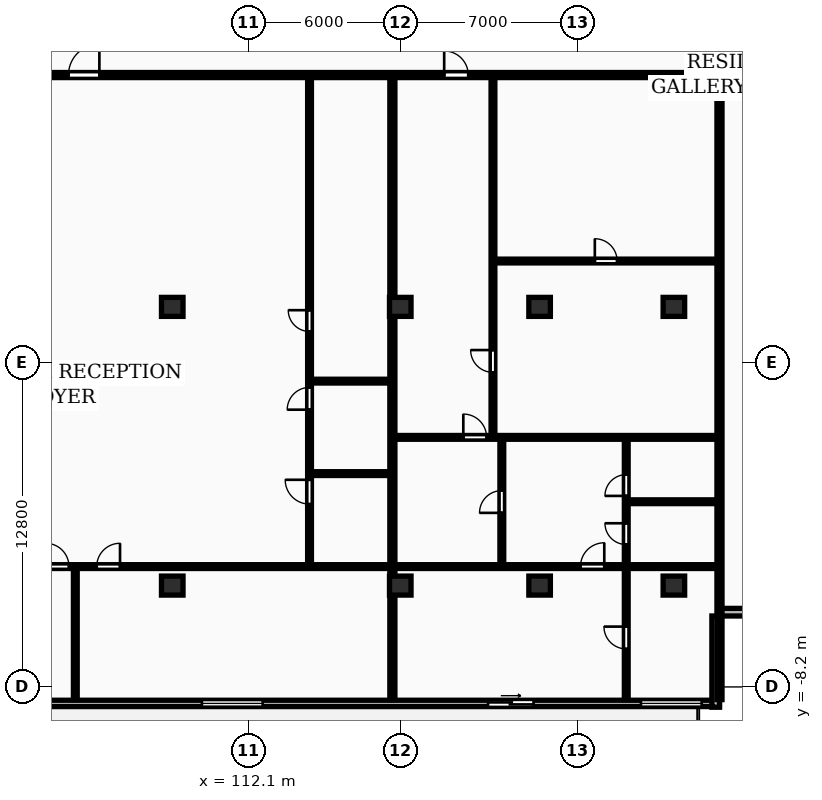
"""IFC4 building model, lengths in metres.
Left out: names, types, materials, properties, quantities, classifications, styles, units other than length and angle.
Written with IfcOpenShell. Run it as: python <this file> out.ifc"""

import sys

from ifc_helpers import new_model, si_unit, direction, frame, frame_2d, origin, origin_2d, place, context, subcontext, project, spatial, rectangle, extrude, element, fill, save


model = new_model("IFC4")
c1 = context("Model", 3, precision=1e-05, world=origin(), true_north=direction((0.0, 1.0)))
c2 = subcontext(c1, "Body", "Model", "MODEL_VIEW")
j1 = project(units=[si_unit("LENGTHUNIT", "METRE"), si_unit("PLANEANGLEUNIT", "RADIAN")], contexts=[c1])
p1 = place(None, origin())
s1 = spatial("IfcSite", under=j1, at=p1, CompositionType="ELEMENT")
p2 = place(p1, origin())
s2 = spatial("IfcBuilding", under=s1, at=p2, CompositionType="ELEMENT")
p3 = place(p2, frame((0.0, 0.0, 93.8)))
s3 = spatial("IfcBuildingStorey", under=s2, at=p3, CompositionType="ELEMENT", Elevation=93.8)
for number, where, z_axis, x_axis in (
    (1, (109.1, -4.2, 0.0), (0.0, 0.0, 1.0), (1.0, 0.0, 0.0)),
    (2, (109.1, 6.8, 0.0), (0.0, 0.0, 1.0), (1.0, 0.0, 0.0)),
    (3, (118.1, -4.2, 0.0), (0.0, 0.0, 1.0), (1.0, 0.0, 0.0)),
    (4, (118.1, 6.8, 0.0), (0.0, 0.0, 1.0), (1.0, 0.0, 0.0)),
    (5, (123.6, -4.2, 0.0), (0.0, 0.0, 1.0), (1.0, 0.0, 0.0)),
    (6, (123.6, 6.8, 0.0), (0.0, 0.0, 1.0), (1.0, 0.0, 0.0)),
    (7, (128.9, -4.2, 0.0), (0.0, 0.0, 1.0), (1.0, 0.0, 0.0)),
    (8, (128.9, 6.8, 0.0), (0.0, 0.0, 1.0), (1.0, 0.0, 0.0)),
):
    element("IfcColumn", number, at=place(p3, frame(where, z_axis=z_axis, x_axis=x_axis)), inside=s3, PredefinedType="COLUMN", context=c2, shape_type="SweptSolid", body=[
        extrude(rectangle(XDim=0.85, YDim=0.75, at=origin_2d()), origin(), (0.0, 0.0, 1.0), 3.25),
    ])
p4 = place(p3, frame((72.7, -8.85, 0.0), z_axis=(0.0, 0.0, 1.0), x_axis=(1.0, 0.0, 0.0)))
e9 = element("IfcWall", 9, at=p4, inside=s3, PredefinedType="STANDARD", context=c2, shape_type="SweptSolid", body=[
    extrude(rectangle(XDim=58.0, YDim=0.25, at=frame_2d((29.0, 0.0))), origin(), (0.0, 0.0, 1.0), 2.97),
])
p5 = place(p4, frame((4.117, 0.0, 0.0)))
e10 = element("IfcOpeningElement", 10, at=p5, cuts=e9, PredefinedType="OPENING", context=c2, shape_type="SweptSolid", body=[
    extrude(rectangle(XDim=1.8, YDim=2.2, at=frame_2d((0.9, 1.1))), frame((0.0, 0.135, 0.0), z_axis=(0.0, -1.0, 0.0), x_axis=(1.0, 0.0, 0.0)), (0.0, 0.0, 1.0), 0.27),
])
p6 = place(p4, frame((15.032, 0.0, 0.85)))
e11 = element("IfcOpeningElement", 11, at=p6, cuts=e9, PredefinedType="OPENING", context=c2, shape_type="SweptSolid", body=[
    extrude(rectangle(XDim=2.4, YDim=1.9, at=frame_2d((1.2, 0.95))), frame((0.0, 0.135, 0.0), z_axis=(0.0, -1.0, 0.0), x_axis=(1.0, 0.0, 0.0)), (0.0, 0.0, 1.0), 0.27),
])
p7 = place(p4, frame((26.781, 0.0, 0.0)))
e12 = element("IfcOpeningElement", 12, at=p7, cuts=e9, PredefinedType="OPENING", context=c2, shape_type="SweptSolid", body=[
    extrude(rectangle(XDim=1.8, YDim=2.2, at=frame_2d((0.9, 1.1))), frame((0.0, 0.135, 0.0), z_axis=(0.0, -1.0, 0.0), x_axis=(1.0, 0.0, 0.0)), (0.0, 0.0, 1.0), 0.27),
])
p8 = place(p4, frame((37.571, 0.0, 0.85)))
e13 = element("IfcOpeningElement", 13, at=p8, cuts=e9, PredefinedType="OPENING", context=c2, shape_type="SweptSolid", body=[
    extrude(rectangle(XDim=2.4, YDim=1.9, at=frame_2d((1.2, 0.95))), frame((0.0, 0.135, 0.0), z_axis=(0.0, -1.0, 0.0), x_axis=(1.0, 0.0, 0.0)), (0.0, 0.0, 1.0), 0.27),
])
p9 = place(p4, frame((48.864, 0.0, 0.0)))
e14 = element("IfcOpeningElement", 14, at=p9, cuts=e9, PredefinedType="OPENING", context=c2, shape_type="SweptSolid", body=[
    extrude(rectangle(XDim=1.8, YDim=2.2, at=frame_2d((0.9, 1.1))), frame((0.0, 0.135, 0.0), z_axis=(0.0, -1.0, 0.0), x_axis=(1.0, 0.0, 0.0)), (0.0, 0.0, 1.0), 0.27),
])
p10 = place(p4, frame((54.9, 0.0, 0.85)))
e15 = element("IfcOpeningElement", 15, at=p10, cuts=e9, PredefinedType="OPENING", context=c2, shape_type="SweptSolid", body=[
    extrude(rectangle(XDim=2.4, YDim=1.9, at=frame_2d((1.2, 0.95))), frame((0.0, 0.135, 0.0), z_axis=(0.0, -1.0, 0.0), x_axis=(1.0, 0.0, 0.0)), (0.0, 0.0, 1.0), 0.27),
])
for number, where, z_axis, x_axis in (
    (16, (130.55, -9.0, 0.0), (0.0, 0.0, 1.0), (0.0, 1.0, 0.0)),
    (17, (130.7, -5.25, 0.0), (0.0, 0.0, 1.0), (1.0, 0.0, 0.0)),
):
    element("IfcWall", number, at=place(p3, frame(where, z_axis=z_axis, x_axis=x_axis)), inside=s3, PredefinedType="STANDARD", context=c2, shape_type="SweptSolid", body=[
        extrude(rectangle(XDim=3.6, YDim=0.3, at=frame_2d((1.8, 0.0))), origin(), (0.0, 0.0, 1.0), 2.97),
    ])
for number, where, z_axis, x_axis in (
    (18, (130.7, -8.7, 0.0), (0.0, 0.0, 1.0), (0.0, 1.0, 0.0)),
    (19, (117.789, -8.7, 0.0), (0.0, 0.0, 1.0), (0.0, 1.0, 0.0)),
):
    element("IfcWall", number, at=place(p3, frame(where, z_axis=z_axis, x_axis=x_axis)), inside=s3, PredefinedType="PARTITIONING", context=c2, shape_type="SweptSolid", body=[
        extrude(rectangle(XDim=24.57, YDim=0.2, at=frame_2d((12.285, 0.0))), origin(), (0.0, 0.0, 1.0), 2.97),
    ])
for number, where, z_axis, x_axis in (
    (20, (114.579, 0.22, 0.0), (0.0, 0.0, 1.0), (1.0, 0.0, 0.0)),
    (21, (114.579, 3.87, 0.0), (0.0, 0.0, 1.0), (1.0, 0.0, 0.0)),
):
    element("IfcWall", number, at=place(p3, frame(where, z_axis=z_axis, x_axis=x_axis)), inside=s3, PredefinedType="PARTITIONING", context=c2, shape_type="SweptSolid", body=[
        extrude(rectangle(XDim=3.13, YDim=0.15, at=frame_2d((1.565, 0.0))), origin(), (0.0, 0.0, 1.0), 2.97),
    ])
p11 = place(p3, frame((114.519, -3.39, 0.0), z_axis=(0.0, 0.0, 1.0), x_axis=(0.0, 1.0, 0.0)))
e22 = element("IfcWall", 22, at=p11, inside=s3, PredefinedType="PARTITIONING", context=c2, shape_type="SweptSolid", body=[
    extrude(rectangle(XDim=19.28, YDim=0.15, at=frame_2d((9.64, 0.0))), origin(), (0.0, 0.0, 1.0), 2.97),
])
p12 = place(p11, frame((2.406, 0.0, 0.0)))
e23 = element("IfcOpeningElement", 23, at=p12, cuts=e22, PredefinedType="OPENING", context=c2, shape_type="SweptSolid", body=[
    extrude(rectangle(XDim=0.96, YDim=2.1, at=frame_2d((0.48, 1.05))), frame((0.0, 0.085, 0.0), z_axis=(0.0, -1.0, 0.0), x_axis=(1.0, 0.0, 0.0)), (0.0, 0.0, 1.0), 0.17),
])
p13 = place(p11, frame((6.133, 0.0, 0.0)))
e24 = element("IfcOpeningElement", 24, at=p13, cuts=e22, PredefinedType="OPENING", context=c2, shape_type="SweptSolid", body=[
    extrude(rectangle(XDim=0.88, YDim=2.06, at=frame_2d((0.44, 1.03))), frame((0.0, 0.085, 0.0), z_axis=(0.0, -1.0, 0.0), x_axis=(1.0, 0.0, 0.0)), (0.0, 0.0, 1.0), 0.17),
])
p14 = place(p11, frame((9.22, 0.0, 0.0)))
e25 = element("IfcOpeningElement", 25, at=p14, cuts=e22, PredefinedType="OPENING", context=c2, shape_type="SweptSolid", body=[
    extrude(rectangle(XDim=0.84, YDim=2.04, at=frame_2d((0.42, 1.02))), frame((0.0, 0.085, 0.0), z_axis=(0.0, -1.0, 0.0), x_axis=(1.0, 0.0, 0.0)), (0.0, 0.0, 1.0), 0.17),
])
p15 = place(p3, frame((105.274, -8.7, 0.0), z_axis=(0.0, 0.0, 1.0), x_axis=(0.0, 1.0, 0.0)))
e26 = element("IfcWall", 26, at=p15, inside=s3, PredefinedType="PARTITIONING", context=c2, shape_type="SweptSolid", body=[
    extrude(rectangle(XDim=5.17, YDim=0.15, at=frame_2d((2.585, 0.0))), origin(), (0.0, 0.0, 1.0), 2.97),
])
p16 = place(p3, frame((95.449, -3.45, 0.0), z_axis=(0.0, 0.0, 1.0), x_axis=(1.0, 0.0, 0.0)))
e27 = element("IfcWall", 27, at=p16, inside=s3, PredefinedType="PARTITIONING", context=c2, shape_type="SweptSolid", body=[
    extrude(rectangle(XDim=22.26, YDim=0.15, at=frame_2d((11.13, 0.0))), origin(), (0.0, 0.0, 1.0), 2.97),
])
p17 = place(p16, frame((8.655, 0.0, 0.0)))
e28 = element("IfcOpeningElement", 28, at=p17, cuts=e27, PredefinedType="OPENING", context=c2, shape_type="SweptSolid", body=[
    extrude(rectangle(XDim=0.92, YDim=2.08, at=frame_2d((0.46, 1.04))), frame((0.0, 0.085, 0.0), z_axis=(0.0, -1.0, 0.0), x_axis=(1.0, 0.0, 0.0)), (0.0, 0.0, 1.0), 0.17),
])
p18 = place(p16, frame((10.67, 0.0, 0.0)))
e29 = element("IfcOpeningElement", 29, at=p18, cuts=e27, PredefinedType="OPENING", context=c2, shape_type="SweptSolid", body=[
    extrude(rectangle(XDim=0.92, YDim=2.08, at=frame_2d((0.46, 1.04))), frame((0.0, 0.085, 0.0), z_axis=(0.0, -1.0, 0.0), x_axis=(1.0, 0.0, 0.0)), (0.0, 0.0, 1.0), 0.17),
])
p19 = place(p3, frame((121.819, 8.61, 0.0), z_axis=(0.0, 0.0, 1.0), x_axis=(1.0, 0.0, 0.0)))
e30 = element("IfcWall", 30, at=p19, inside=s3, PredefinedType="PARTITIONING", context=c2, shape_type="SweptSolid", body=[
    extrude(rectangle(XDim=8.802, YDim=0.15, at=frame_2d((4.401, 0.0))), origin(), (0.0, 0.0, 1.0), 2.97),
])
p20 = place(p19, frame((3.961, 0.0, 0.0)))
e31 = element("IfcOpeningElement", 31, at=p20, cuts=e30, PredefinedType="OPENING", context=c2, shape_type="SweptSolid", body=[
    extrude(rectangle(XDim=0.88, YDim=2.06, at=frame_2d((0.44, 1.03))), frame((0.0, 0.085, 0.0), z_axis=(0.0, -1.0, 0.0), x_axis=(1.0, 0.0, 0.0)), (0.0, 0.0, 1.0), 0.17),
])
p21 = place(p3, frame((121.759, 1.69, 0.0), z_axis=(0.0, 0.0, 1.0), x_axis=(0.0, 1.0, 0.0)))
e32 = element("IfcWall", 32, at=p21, inside=s3, PredefinedType="PARTITIONING", context=c2, shape_type="SweptSolid", body=[
    extrude(rectangle(XDim=14.2, YDim=0.15, at=frame_2d((7.1, 0.0))), origin(), (0.0, 0.0, 1.0), 2.97),
])
p22 = place(p21, frame((2.526, 0.0, 0.0)))
e33 = element("IfcOpeningElement", 33, at=p22, cuts=e32, PredefinedType="OPENING", context=c2, shape_type="SweptSolid", body=[
    extrude(rectangle(XDim=0.88, YDim=2.06, at=frame_2d((0.44, 1.03))), frame((0.0, 0.085, 0.0), z_axis=(0.0, -1.0, 0.0), x_axis=(1.0, 0.0, 0.0)), (0.0, 0.0, 1.0), 0.17),
])
p23 = place(p3, frame((122.109, -3.39, 0.0), z_axis=(0.0, 0.0, 1.0), x_axis=(0.0, 1.0, 0.0)))
e34 = element("IfcWall", 34, at=p23, inside=s3, PredefinedType="PARTITIONING", context=c2, shape_type="SweptSolid", body=[
    extrude(rectangle(XDim=5.0, YDim=0.15, at=frame_2d((2.5, 0.0))), origin(), (0.0, 0.0, 1.0), 2.97),
])
p24 = place(p23, frame((2.06, 0.0, 0.0)))
e35 = element("IfcOpeningElement", 35, at=p24, cuts=e34, PredefinedType="OPENING", context=c2, shape_type="SweptSolid", body=[
    extrude(rectangle(XDim=0.88, YDim=2.06, at=frame_2d((0.44, 1.03))), frame((0.0, 0.085, 0.0), z_axis=(0.0, -1.0, 0.0), x_axis=(1.0, 0.0, 0.0)), (0.0, 0.0, 1.0), 0.17),
])
p25 = place(p3, frame((127.08, -0.89, 0.0), z_axis=(0.0, 0.0, 1.0), x_axis=(1.0, 0.0, 0.0)))
e36 = element("IfcWall", 36, at=p25, inside=s3, PredefinedType="PARTITIONING", context=c2, shape_type="SweptSolid", body=[
    extrude(rectangle(XDim=3.54, YDim=0.15, at=frame_2d((1.77, 0.0))), origin(), (0.0, 0.0, 1.0), 2.97),
])
p26 = place(p3, frame((127.02, -8.7, 0.0), z_axis=(0.0, 0.0, 1.0), x_axis=(0.0, 1.0, 0.0)))
e37 = element("IfcWall", 37, at=p26, inside=s3, PredefinedType="PARTITIONING", context=c2, shape_type="SweptSolid", body=[
    extrude(rectangle(XDim=10.31, YDim=0.15, at=frame_2d((5.155, 0.0))), origin(), (0.0, 0.0, 1.0), 2.97),
])
p27 = place(p26, frame((6.12, 0.0, 0.0)))
e38 = element("IfcOpeningElement", 38, at=p27, cuts=e37, PredefinedType="OPENING", context=c2, shape_type="SweptSolid", body=[
    extrude(rectangle(XDim=0.84, YDim=2.04, at=frame_2d((0.42, 1.02))), frame((0.0, 0.085, 0.0), z_axis=(0.0, -1.0, 0.0), x_axis=(1.0, 0.0, 0.0)), (0.0, 0.0, 1.0), 0.17),
])
p28 = place(p26, frame((8.04, 0.0, 0.0)))
e39 = element("IfcOpeningElement", 39, at=p28, cuts=e37, PredefinedType="OPENING", context=c2, shape_type="SweptSolid", body=[
    extrude(rectangle(XDim=0.84, YDim=2.04, at=frame_2d((0.42, 1.02))), frame((0.0, 0.085, 0.0), z_axis=(0.0, -1.0, 0.0), x_axis=(1.0, 0.0, 0.0)), (0.0, 0.0, 1.0), 0.17),
])
p29 = place(p26, frame((2.001, 0.0, 0.0)))
e40 = element("IfcOpeningElement", 40, at=p29, cuts=e37, PredefinedType="OPENING", context=c2, shape_type="SweptSolid", body=[
    extrude(rectangle(XDim=0.88, YDim=2.06, at=frame_2d((0.44, 1.03))), frame((0.0, 0.085, 0.0), z_axis=(0.0, -1.0, 0.0), x_axis=(1.0, 0.0, 0.0)), (0.0, 0.0, 1.0), 0.17),
])
p30 = place(p3, frame((117.869, 1.65, 0.0), z_axis=(0.0, 0.0, 1.0), x_axis=(1.0, 0.0, 0.0)))
e41 = element("IfcWall", 41, at=p30, inside=s3, PredefinedType="PARTITIONING", context=c2, shape_type="SweptSolid", body=[
    extrude(rectangle(XDim=12.751, YDim=0.15, at=frame_2d((6.376, 0.0))), origin(), (0.0, 0.0, 1.0), 2.97),
])
p31 = place(p30, frame((2.72, 0.0, 0.0)))
e42 = element("IfcOpeningElement", 42, at=p31, cuts=e41, PredefinedType="OPENING", context=c2, shape_type="SweptSolid", body=[
    extrude(rectangle(XDim=0.92, YDim=2.08, at=frame_2d((0.46, 1.04))), frame((0.0, 0.085, 0.0), z_axis=(0.0, -1.0, 0.0), x_axis=(1.0, 0.0, 0.0)), (0.0, 0.0, 1.0), 0.17),
])
p32 = place(p3, frame((117.869, -3.45, 0.0), z_axis=(0.0, 0.0, 1.0), x_axis=(1.0, 0.0, 0.0)))
e43 = element("IfcWall", 43, at=p32, inside=s3, PredefinedType="PARTITIONING", context=c2, shape_type="SweptSolid", body=[
    extrude(rectangle(XDim=12.751, YDim=0.15, at=frame_2d((6.376, 0.0))), origin(), (0.0, 0.0, 1.0), 2.97),
])
p33 = place(p32, frame((7.344, 0.0, 0.0)))
e44 = element("IfcOpeningElement", 44, at=p33, cuts=e43, PredefinedType="OPENING", context=c2, shape_type="SweptSolid", body=[
    extrude(rectangle(XDim=0.94, YDim=2.1, at=frame_2d((0.47, 1.05))), frame((0.0, 0.085, 0.0), z_axis=(0.0, -1.0, 0.0), x_axis=(1.0, 0.0, 0.0)), (0.0, 0.0, 1.0), 0.17),
])
p34 = place(p3, frame((72.7, 15.95, 0.0), z_axis=(0.0, 0.0, 1.0), x_axis=(1.0, 0.0, 0.0)))
e45 = element("IfcWall", 45, at=p34, inside=s3, PredefinedType="PARTITIONING", context=c2, shape_type="SweptSolid", body=[
    extrude(rectangle(XDim=58.0, YDim=0.2, at=frame_2d((29.0, 0.0))), origin(), (0.0, 0.0, 1.0), 2.97),
])
p35 = place(p34, frame((11.114, 0.0, 0.0)))
e46 = element("IfcOpeningElement", 46, at=p35, cuts=e45, PredefinedType="OPENING", context=c2, shape_type="SweptSolid", body=[
    extrude(rectangle(XDim=1.22, YDim=2.18, at=frame_2d((0.61, 1.09))), frame((0.0, 0.11, 0.0), z_axis=(0.0, -1.0, 0.0), x_axis=(1.0, 0.0, 0.0)), (0.0, 0.0, 1.0), 0.22),
])
p36 = place(p34, frame((32.304, 0.0, 0.0)))
e47 = element("IfcOpeningElement", 47, at=p36, cuts=e45, PredefinedType="OPENING", context=c2, shape_type="SweptSolid", body=[
    extrude(rectangle(XDim=1.22, YDim=2.18, at=frame_2d((0.61, 1.09))), frame((0.0, 0.11, 0.0), z_axis=(0.0, -1.0, 0.0), x_axis=(1.0, 0.0, 0.0)), (0.0, 0.0, 1.0), 0.22),
])
p37 = place(p34, frame((47.134, 0.0, 0.0)))
e48 = element("IfcOpeningElement", 48, at=p37, cuts=e45, PredefinedType="OPENING", context=c2, shape_type="SweptSolid", body=[
    extrude(rectangle(XDim=0.95, YDim=2.15, at=frame_2d((0.475, 1.075))), frame((0.0, 0.11, 0.0), z_axis=(0.0, -1.0, 0.0), x_axis=(1.0, 0.0, 0.0)), (0.0, 0.0, 1.0), 0.22),
])
p38 = place(p8, origin())
e49 = element("IfcWindow", 49, at=p38, inside=s3, PartitioningType="DOUBLE_PANEL_VERTICAL", PredefinedType="WINDOW", context=c2, shape_type="SweptSolid", body=[
    extrude(rectangle(XDim=2.4, YDim=1.9, at=frame_2d((1.2, 0.95))), frame((0.0, 0.03, 0.0), z_axis=(0.0, -1.0, 0.0), x_axis=(1.0, 0.0, 0.0)), (0.0, 0.0, 1.0), 0.06),
])
fill(e13, e49)
p39 = place(p9, origin())
e50 = element("IfcDoor", 50, at=p39, inside=s3, OperationType="SLIDING_TO_RIGHT", PredefinedType="DOOR", context=c2, shape_type="SweptSolid", body=[
    extrude(rectangle(XDim=1.8, YDim=2.2, at=frame_2d((0.9, 1.1))), frame((0.0, 0.025, 0.0), z_axis=(0.0, -1.0, 0.0), x_axis=(1.0, 0.0, 0.0)), (0.0, 0.0, 1.0), 0.05),
])
fill(e14, e50)
p40 = place(p10, origin())
e51 = element("IfcWindow", 51, at=p40, inside=s3, PartitioningType="DOUBLE_PANEL_VERTICAL", PredefinedType="WINDOW", context=c2, shape_type="SweptSolid", body=[
    extrude(rectangle(XDim=2.4, YDim=1.9, at=frame_2d((1.2, 0.95))), frame((0.0, 0.03, 0.0), z_axis=(0.0, -1.0, 0.0), x_axis=(1.0, 0.0, 0.0)), (0.0, 0.0, 1.0), 0.06),
])
fill(e15, e51)
p41 = place(p12, origin())
e52 = element("IfcDoor", 52, at=p41, inside=s3, OperationType="SINGLE_SWING_RIGHT", PredefinedType="DOOR", context=c2, shape_type="SweptSolid", body=[
    extrude(rectangle(XDim=0.96, YDim=2.1, at=frame_2d((0.48, 1.05))), frame((0.0, 0.025, 0.0), z_axis=(0.0, -1.0, 0.0), x_axis=(1.0, 0.0, 0.0)), (0.0, 0.0, 1.0), 0.05),
])
fill(e23, e52)
p42 = place(p13, origin())
e53 = element("IfcDoor", 53, at=p42, inside=s3, OperationType="SINGLE_SWING_LEFT", PredefinedType="DOOR", context=c2, shape_type="SweptSolid", body=[
    extrude(rectangle(XDim=0.88, YDim=2.06, at=frame_2d((0.44, 1.03))), frame((0.0, 0.025, 0.0), z_axis=(0.0, -1.0, 0.0), x_axis=(1.0, 0.0, 0.0)), (0.0, 0.0, 1.0), 0.05),
])
fill(e24, e53)
p43 = place(p14, origin())
e54 = element("IfcDoor", 54, at=p43, inside=s3, OperationType="SINGLE_SWING_RIGHT", PredefinedType="DOOR", context=c2, shape_type="SweptSolid", body=[
    extrude(rectangle(XDim=0.84, YDim=2.04, at=frame_2d((0.42, 1.02))), frame((0.0, 0.025, 0.0), z_axis=(0.0, -1.0, 0.0), x_axis=(1.0, 0.0, 0.0)), (0.0, 0.0, 1.0), 0.05),
])
fill(e25, e54)
p44 = place(p17, origin())
e55 = element("IfcDoor", 55, at=p44, inside=s3, OperationType="SINGLE_SWING_LEFT", PredefinedType="DOOR", context=c2, shape_type="SweptSolid", body=[
    extrude(rectangle(XDim=0.92, YDim=2.08, at=frame_2d((0.46, 1.04))), frame((0.0, 0.025, 0.0), z_axis=(0.0, -1.0, 0.0), x_axis=(1.0, 0.0, 0.0)), (0.0, 0.0, 1.0), 0.05),
])
fill(e28, e55)
p45 = place(p18, origin())
e56 = element("IfcDoor", 56, at=p45, inside=s3, OperationType="SINGLE_SWING_RIGHT", PredefinedType="DOOR", context=c2, shape_type="SweptSolid", body=[
    extrude(rectangle(XDim=0.92, YDim=2.08, at=frame_2d((0.46, 1.04))), frame((0.0, 0.025, 0.0), z_axis=(0.0, -1.0, 0.0), x_axis=(1.0, 0.0, 0.0)), (0.0, 0.0, 1.0), 0.05),
])
fill(e29, e56)
p46 = place(p20, origin())
e57 = element("IfcDoor", 57, at=p46, inside=s3, OperationType="SINGLE_SWING_LEFT", PredefinedType="DOOR", context=c2, shape_type="SweptSolid", body=[
    extrude(rectangle(XDim=0.88, YDim=2.06, at=frame_2d((0.44, 1.03))), frame((0.0, 0.025, 0.0), z_axis=(0.0, -1.0, 0.0), x_axis=(1.0, 0.0, 0.0)), (0.0, 0.0, 1.0), 0.05),
])
fill(e31, e57)
p47 = place(p22, origin())
e58 = element("IfcDoor", 58, at=p47, inside=s3, OperationType="SINGLE_SWING_RIGHT", PredefinedType="DOOR", context=c2, shape_type="SweptSolid", body=[
    extrude(rectangle(XDim=0.88, YDim=2.06, at=frame_2d((0.44, 1.03))), frame((0.0, 0.025, 0.0), z_axis=(0.0, -1.0, 0.0), x_axis=(1.0, 0.0, 0.0)), (0.0, 0.0, 1.0), 0.05),
])
fill(e33, e58)
p48 = place(p24, origin())
e59 = element("IfcDoor", 59, at=p48, inside=s3, OperationType="SINGLE_SWING_LEFT", PredefinedType="DOOR", context=c2, shape_type="SweptSolid", body=[
    extrude(rectangle(XDim=0.88, YDim=2.06, at=frame_2d((0.44, 1.03))), frame((0.0, 0.025, 0.0), z_axis=(0.0, -1.0, 0.0), x_axis=(1.0, 0.0, 0.0)), (0.0, 0.0, 1.0), 0.05),
])
fill(e35, e59)
p49 = place(p27, origin())
e60 = element("IfcDoor", 60, at=p49, inside=s3, OperationType="SINGLE_SWING_RIGHT", PredefinedType="DOOR", context=c2, shape_type="SweptSolid", body=[
    extrude(rectangle(XDim=0.84, YDim=2.04, at=frame_2d((0.42, 1.02))), frame((0.0, 0.025, 0.0), z_axis=(0.0, -1.0, 0.0), x_axis=(1.0, 0.0, 0.0)), (0.0, 0.0, 1.0), 0.05),
])
fill(e38, e60)
p50 = place(p28, origin())
e61 = element("IfcDoor", 61, at=p50, inside=s3, OperationType="SINGLE_SWING_LEFT", PredefinedType="DOOR", context=c2, shape_type="SweptSolid", body=[
    extrude(rectangle(XDim=0.84, YDim=2.04, at=frame_2d((0.42, 1.02))), frame((0.0, 0.025, 0.0), z_axis=(0.0, -1.0, 0.0), x_axis=(1.0, 0.0, 0.0)), (0.0, 0.0, 1.0), 0.05),
])
fill(e39, e61)
p51 = place(p29, origin())
e62 = element("IfcDoor", 62, at=p51, inside=s3, OperationType="SINGLE_SWING_RIGHT", PredefinedType="DOOR", context=c2, shape_type="SweptSolid", body=[
    extrude(rectangle(XDim=0.88, YDim=2.06, at=frame_2d((0.44, 1.03))), frame((0.0, 0.025, 0.0), z_axis=(0.0, -1.0, 0.0), x_axis=(1.0, 0.0, 0.0)), (0.0, 0.0, 1.0), 0.05),
])
fill(e40, e62)
p52 = place(p31, origin())
e63 = element("IfcDoor", 63, at=p52, inside=s3, OperationType="SINGLE_SWING_LEFT", PredefinedType="DOOR", context=c2, shape_type="SweptSolid", body=[
    extrude(rectangle(XDim=0.92, YDim=2.08, at=frame_2d((0.46, 1.04))), frame((0.0, 0.025, 0.0), z_axis=(0.0, -1.0, 0.0), x_axis=(1.0, 0.0, 0.0)), (0.0, 0.0, 1.0), 0.05),
])
fill(e42, e63)
p53 = place(p33, origin())
e64 = element("IfcDoor", 64, at=p53, inside=s3, OperationType="SINGLE_SWING_RIGHT", PredefinedType="DOOR", context=c2, shape_type="SweptSolid", body=[
    extrude(rectangle(XDim=0.94, YDim=2.1, at=frame_2d((0.47, 1.05))), frame((0.0, 0.025, 0.0), z_axis=(0.0, -1.0, 0.0), x_axis=(1.0, 0.0, 0.0)), (0.0, 0.0, 1.0), 0.05),
])
fill(e44, e64)
p54 = place(p36, origin())
e65 = element("IfcDoor", 65, at=p54, inside=s3, OperationType="SINGLE_SWING_RIGHT", PredefinedType="DOOR", context=c2, shape_type="SweptSolid", body=[
    extrude(rectangle(XDim=1.22, YDim=2.18, at=frame_2d((0.61, 1.09))), frame((0.0, 0.025, 0.0), z_axis=(0.0, -1.0, 0.0), x_axis=(1.0, 0.0, 0.0)), (0.0, 0.0, 1.0), 0.05),
])
fill(e47, e65)
p55 = place(p37, origin())
e66 = element("IfcDoor", 66, at=p55, inside=s3, OperationType="SINGLE_SWING_LEFT", PredefinedType="DOOR", context=c2, shape_type="SweptSolid", body=[
    extrude(rectangle(XDim=0.95, YDim=2.15, at=frame_2d((0.475, 1.075))), frame((0.0, 0.025, 0.0), z_axis=(0.0, -1.0, 0.0), x_axis=(1.0, 0.0, 0.0)), (0.0, 0.0, 1.0), 0.05),
])
fill(e48, e66)
save(model, sys.argv[1])
